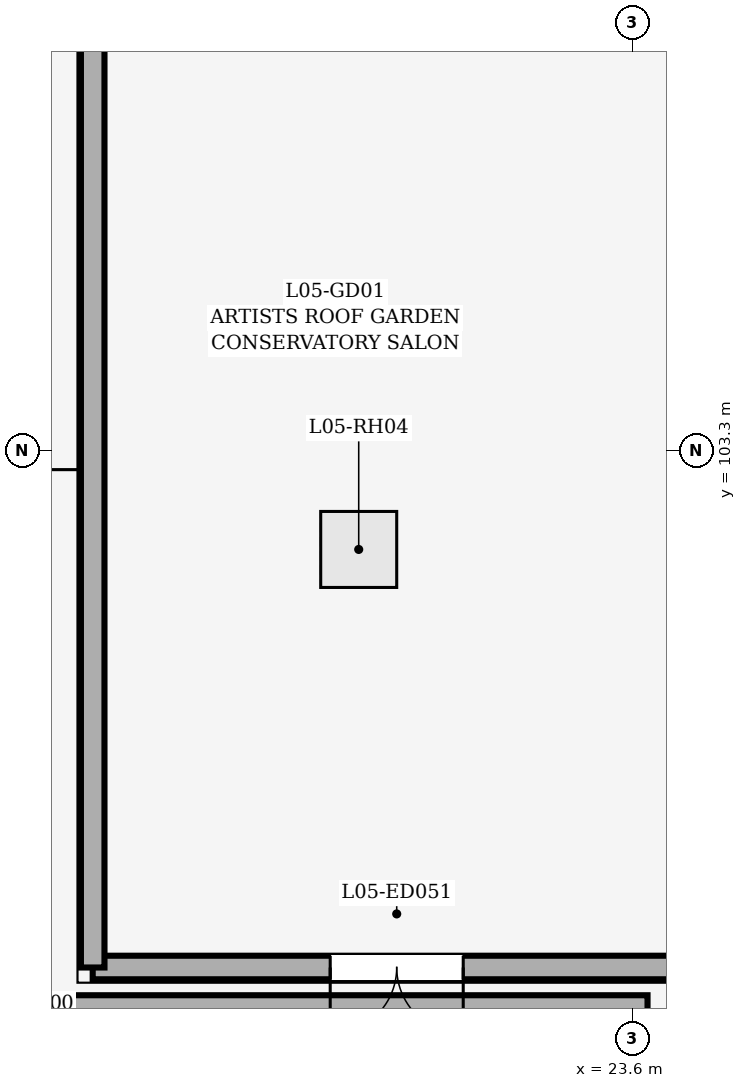
"""IFC4 building model, lengths in metres.
Left out: names, types, materials, properties, quantities, classifications, styles, units other than length and angle.
Written with IfcOpenShell. Run it as: python <this file> out.ifc"""

import sys

from ifc_helpers import new_model, si_unit, direction, frame, frame_2d, origin, origin_2d, place, context, subcontext, project, spatial, rectangle, extrude, element, fill, save


model = new_model("IFC4")
c1 = context("Model", 3, precision=1e-05, world=origin(), true_north=direction((0.0, 1.0)))
c2 = subcontext(c1, "Body", "Model", "MODEL_VIEW")
j1 = project(units=[si_unit("LENGTHUNIT", "METRE"), si_unit("PLANEANGLEUNIT", "RADIAN")], contexts=[c1])
p1 = place(None, origin())
s1 = spatial("IfcSite", under=j1, at=p1, CompositionType="ELEMENT")
p2 = place(p1, origin())
s2 = spatial("IfcBuilding", under=s1, at=p2, CompositionType="ELEMENT")
p3 = place(p2, frame((0.0, 0.0, 19.2)))
s3 = spatial("IfcBuildingStorey", under=s2, at=p3, CompositionType="ELEMENT", Elevation=19.2)
p4 = place(p3, frame((24.5, 96.5, 0.0), z_axis=(0.0, 0.0, 1.0), x_axis=(-1.0, 0.0, 0.0)))
e1 = element("IfcWall", 1, at=p4, inside=s3, PredefinedType="STANDARD", context=c2, shape_type="SweptSolid", body=[
    extrude(rectangle(XDim=8.0, YDim=0.31, at=frame_2d((4.0, 0.0))), origin(), (0.0, 0.0, 1.0), 3.6),
])
p5 = place(p4, frame((3.125, 0.0, 0.0)))
e2 = element("IfcOpeningElement", 2, at=p5, cuts=e1, PredefinedType="OPENING", context=c2, shape_type="SweptSolid", body=[
    extrude(rectangle(XDim=1.75, YDim=2.2, at=frame_2d((0.875, 1.1))), frame((0.0, 0.167, 0.0), z_axis=(0.0, -1.0, 0.0), x_axis=(1.0, 0.0, 0.0)), (0.0, 0.0, 1.0), 0.334),
])
p6 = place(p3, frame((16.5, 96.5, 0.0), z_axis=(0.0, 0.0, 1.0), x_axis=(0.0, 1.0, 0.0)))
e3 = element("IfcWall", 3, at=p6, inside=s3, PredefinedType="STANDARD", context=c2, shape_type="SweptSolid", body=[
    extrude(rectangle(XDim=13.1, YDim=0.31, at=frame_2d((6.55, 0.0))), origin(), (0.0, 0.0, 1.0), 3.6),
])
p7 = place(p3, frame((6.8, 96.02, 0.0), z_axis=(0.0, 0.0, 1.0), x_axis=(1.0, 0.0, 0.0)))
e4 = element("IfcWall", 4, at=p7, inside=s3, PredefinedType="PARAPET", context=c2, shape_type="SweptSolid", body=[
    extrude(rectangle(XDim=17.0, YDim=0.23, at=frame_2d((8.5, 0.0))), origin(), (0.0, 0.0, 1.0), 1.2),
])
p8 = place(p5, origin())
e5 = element("IfcDoor", 5, at=p8, inside=s3, OperationType="DOUBLE_DOOR_SINGLE_SWING", PredefinedType="DOOR", context=c2, shape_type="SweptSolid", body=[
    extrude(rectangle(XDim=1.75, YDim=2.2, at=frame_2d((0.875, 1.1))), frame((0.0, 0.025, 0.0), z_axis=(0.0, -1.0, 0.0), x_axis=(1.0, 0.0, 0.0)), (0.0, 0.0, 1.0), 0.05),
])
fill(e2, e5)
p9 = place(p3, frame((0.0, 0.0, 3.6)))
p10 = place(p9, frame((20.0, 102.0, 0.16)))
e6 = element("IfcDoor", 6, at=p10, inside=s3, OperationType="SINGLE_SWING_LEFT", PredefinedType="TRAPDOOR", context=c2, shape_type="SweptSolid", body=[
    extrude(rectangle(XDim=1.0, YDim=1.0, at=origin_2d()), origin(), (0.0, 0.0, 1.0), 0.05),
])
save(model, sys.argv[1])
